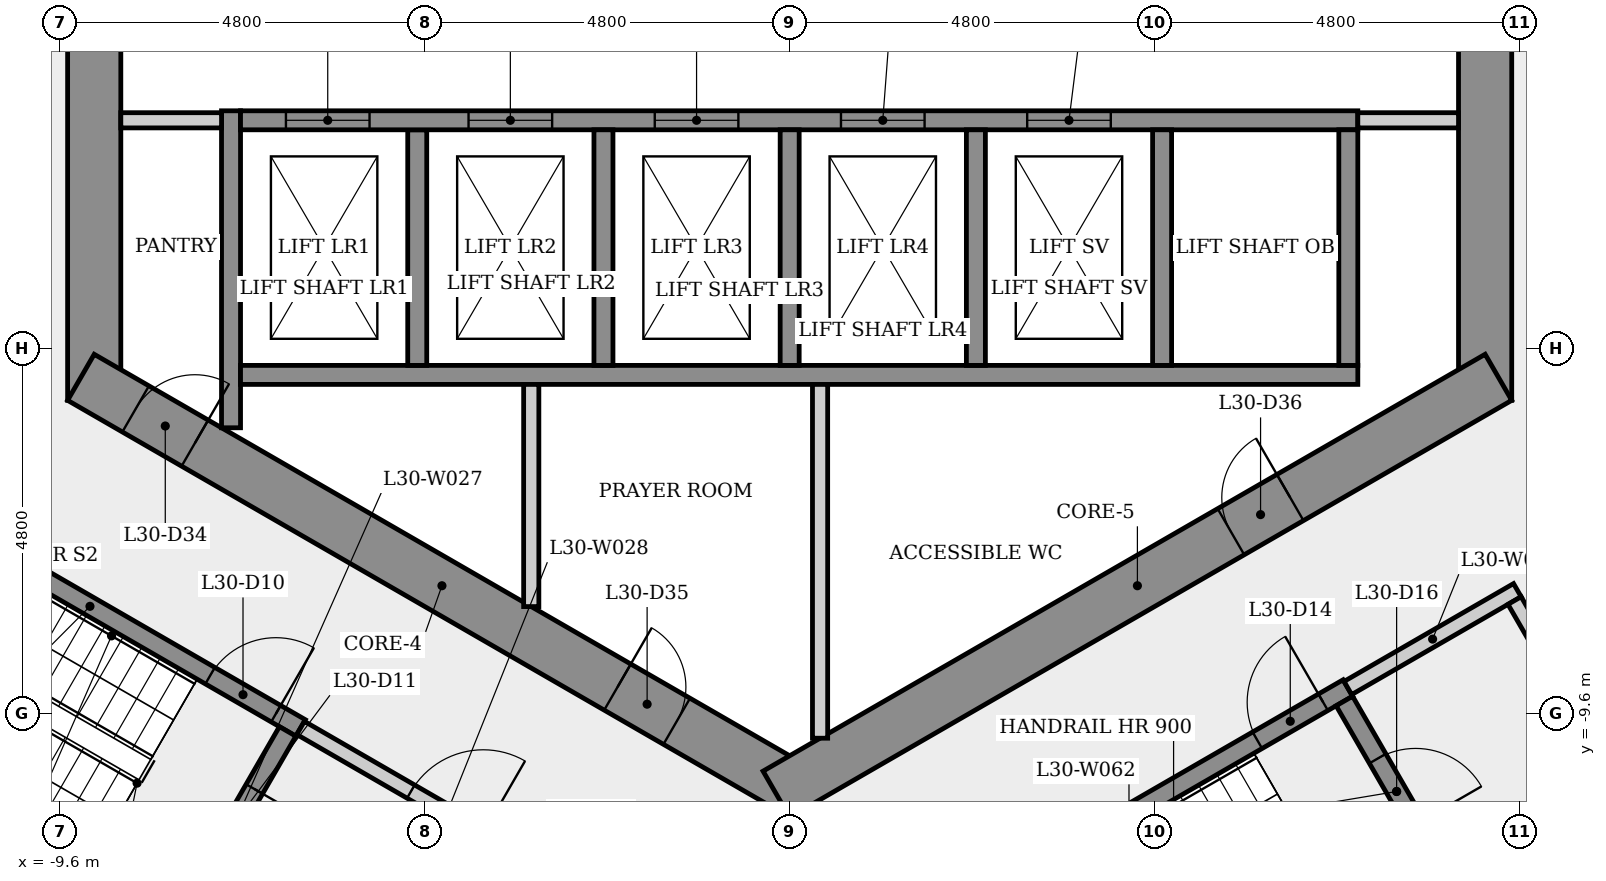
"""IFC4 building model, lengths in metres.
Left out: names, types, materials, properties, quantities, classifications, styles, units other than length and angle.
Written with IfcOpenShell. Run it as: python <this file> out.ifc"""

import sys

from ifc_helpers import new_model, si_unit, direction, frame, frame_2d, origin, place, context, subcontext, project, spatial, rectangle, extrude, element, fill, save


model = new_model("IFC4")
c1 = context("Model", 3, precision=1e-05, world=origin(), true_north=direction((0.0, 1.0)))
c2 = subcontext(c1, "Body", "Model", "MODEL_VIEW")
j1 = project(units=[si_unit("LENGTHUNIT", "METRE"), si_unit("PLANEANGLEUNIT", "RADIAN")], contexts=[c1])
p1 = place(None, origin())
s1 = spatial("IfcSite", under=j1, at=p1, CompositionType="ELEMENT")
p2 = place(p1, origin())
s2 = spatial("IfcBuilding", under=s1, at=p2, CompositionType="ELEMENT")
p3 = place(p2, frame((0.0, 0.0, 113.7)))
s3 = spatial("IfcBuildingStorey", under=s2, at=p3, CompositionType="ELEMENT", Elevation=113.7)
p4 = place(p3, frame((9.15, -5.485, 0.0), z_axis=(0.0, 0.0, 1.0), x_axis=(0.0, 1.0, 0.0)))
e1 = element("IfcWall", 1, at=p4, inside=s3, PredefinedType="SHEAR", context=c2, shape_type="SweptSolid", body=[
    extrude(rectangle(XDim=10.97, YDim=0.7, at=frame_2d((5.485, 0.0))), origin(), (0.0, 0.0, 1.0), 3.4),
])
p5 = place(p4, frame((4.685, 0.0, 0.0)))
e2 = element("IfcOpeningElement", 2, at=p5, cuts=e1, PredefinedType="OPENING", context=c2, shape_type="SweptSolid", body=[
    extrude(rectangle(XDim=1.6, YDim=2.1, at=frame_2d((0.8, 1.05))), frame((0.0, 0.36, 0.0), z_axis=(0.0, -1.0, 0.0), x_axis=(1.0, 0.0, 0.0)), (0.0, 0.0, 1.0), 0.72),
])
p6 = place(p3, frame((-9.15, 5.485, 0.0), z_axis=(0.0, 0.0, 1.0), x_axis=(0.0, -1.0, 0.0)))
e3 = element("IfcWall", 3, at=p6, inside=s3, PredefinedType="SHEAR", context=c2, shape_type="SweptSolid", body=[
    extrude(rectangle(XDim=10.97, YDim=0.7, at=frame_2d((5.485, 0.0))), origin(), (0.0, 0.0, 1.0), 3.4),
])
p7 = place(p6, frame((4.685, 0.0, 0.0)))
e4 = element("IfcOpeningElement", 4, at=p7, cuts=e3, PredefinedType="OPENING", context=c2, shape_type="SweptSolid", body=[
    extrude(rectangle(XDim=1.6, YDim=2.1, at=frame_2d((0.8, 1.05))), frame((0.0, 0.36, 0.0), z_axis=(0.0, -1.0, 0.0), x_axis=(1.0, 0.0, 0.0)), (0.0, 0.0, 1.0), 0.72),
])
p8 = place(p3, frame((-9.325, -5.182, 0.0), z_axis=(0.0, 0.0, 1.0), x_axis=(0.866023993627, -0.500002442456, 0.0)))
e5 = element("IfcWall", 5, at=p8, inside=s3, PredefinedType="SHEAR", context=c2, shape_type="SweptSolid", body=[
    extrude(rectangle(XDim=10.97, YDim=0.7, at=frame_2d((5.485, 0.0))), origin(), (0.0, 0.0, 1.0), 3.4),
])
p9 = place(p8, frame((0.832, 0.0, 0.0)))
e6 = element("IfcOpeningElement", 6, at=p9, cuts=e5, PredefinedType="OPENING", context=c2, shape_type="SweptSolid", body=[
    extrude(rectangle(XDim=0.9, YDim=2.1, at=frame_2d((0.45, 1.05))), frame((0.0, 0.36, 0.0), z_axis=(0.0, -1.0, 0.0), x_axis=(1.0, 0.0, 0.0)), (0.0, 0.0, 1.0), 0.72),
])
p10 = place(p8, frame((8.152, 0.0, 0.0)))
e7 = element("IfcOpeningElement", 7, at=p10, cuts=e5, PredefinedType="OPENING", context=c2, shape_type="SweptSolid", body=[
    extrude(rectangle(XDim=0.9, YDim=2.1, at=frame_2d((0.45, 1.05))), frame((0.0, 0.36, 0.0), z_axis=(0.0, -1.0, 0.0), x_axis=(1.0, 0.0, 0.0)), (0.0, 0.0, 1.0), 0.72),
])
p11 = place(p3, frame((-0.175, -10.667, 0.0), z_axis=(0.0, 0.0, 1.0), x_axis=(0.866023993627, 0.500002442456, 0.0)))
e8 = element("IfcWall", 8, at=p11, inside=s3, PredefinedType="SHEAR", context=c2, shape_type="SweptSolid", body=[
    extrude(rectangle(XDim=10.97, YDim=0.7, at=frame_2d((5.485, 0.0))), origin(), (0.0, 0.0, 1.0), 3.4),
])
p12 = place(p11, frame((6.906, 0.0, 0.0)))
e9 = element("IfcOpeningElement", 9, at=p12, cuts=e8, PredefinedType="OPENING", context=c2, shape_type="SweptSolid", body=[
    extrude(rectangle(XDim=0.9, YDim=2.1, at=frame_2d((0.45, 1.05))), frame((0.0, 0.36, 0.0), z_axis=(0.0, -1.0, 0.0), x_axis=(1.0, 0.0, 0.0)), (0.0, 0.0, 1.0), 0.72),
])
p13 = place(p3, frame((-11.977, -6.595, 0.0), z_axis=(0.0, 0.0, 1.0), x_axis=(0.866025499775, -0.499999833739, 0.0)))
e10 = element("IfcWall", 10, at=p13, inside=s3, PredefinedType="SHEAR", context=c2, shape_type="SweptSolid", body=[
    extrude(rectangle(XDim=6.4, YDim=0.25, at=frame_2d((3.2, 0.0))), origin(), (0.0, 0.0, 1.0), 3.05),
])
p14 = place(p13, frame((5.025, 0.0, 0.0)))
e11 = element("IfcOpeningElement", 11, at=p14, cuts=e10, PredefinedType="OPENING", context=c2, shape_type="SweptSolid", body=[
    extrude(rectangle(XDim=1.0, YDim=2.1, at=frame_2d((0.5, 1.05))), frame((0.0, 0.135, 0.0), z_axis=(0.0, -1.0, 0.0), x_axis=(1.0, 0.0, 0.0)), (0.0, 0.0, 1.0), 0.27),
])
p15 = place(p3, frame((-7.935, -12.393, 0.0), z_axis=(0.0, 0.0, 1.0), x_axis=(-0.866025499775, 0.499999833739, 0.0)))
e12 = element("IfcWall", 12, at=p15, inside=s3, PredefinedType="SHEAR", context=c2, shape_type="SweptSolid", body=[
    extrude(rectangle(XDim=6.4, YDim=0.25, at=frame_2d((3.2, 0.0))), origin(), (0.0, 0.0, 1.0), 3.05),
])
p16 = place(p3, frame((-7.35, -5.846, 0.0), z_axis=(0.0, 0.0, 1.0), x_axis=(0.0, 1.0, 0.0)))
e13 = element("IfcWall", 13, at=p16, inside=s3, PredefinedType="SHEAR", context=c2, shape_type="SweptSolid", body=[
    extrude(rectangle(XDim=4.171, YDim=0.25, at=frame_2d((2.085, 0.0))), origin(), (0.0, 0.0, 1.0), 3.05),
])
p17 = place(p3, frame((-7.475, -1.8, 0.0), z_axis=(0.0, 0.0, 1.0), x_axis=(-1.0, 0.0, 0.0)))
e14 = element("IfcWall", 14, at=p17, inside=s3, PredefinedType="PARTITIONING", context=c2, shape_type="SweptSolid", body=[
    extrude(rectangle(XDim=1.325, YDim=0.2, at=frame_2d((0.663, 0.0))), origin(), (0.0, 0.0, 1.0), 3.05),
])
p18 = place(p3, frame((-6.605, -9.841, 0.0), z_axis=(0.0, 0.0, 1.0), x_axis=(-0.499996545922, -0.866027397988, 0.0)))
e15 = element("IfcWall", 15, at=p18, inside=s3, PredefinedType="SHEAR", context=c2, shape_type="SweptSolid", body=[
    extrude(rectangle(XDim=2.75, YDim=0.25, at=frame_2d((1.375, 0.0))), origin(), (0.0, 0.0, 1.0), 3.05),
])
p19 = place(p18, frame((0.875, 0.0, 0.0)))
e16 = element("IfcOpeningElement", 16, at=p19, cuts=e15, PredefinedType="OPENING", context=c2, shape_type="SweptSolid", body=[
    extrude(rectangle(XDim=1.0, YDim=2.1, at=frame_2d((0.5, 1.05))), frame((0.0, 0.135, 0.0), z_axis=(0.0, -1.0, 0.0), x_axis=(1.0, 0.0, 0.0)), (0.0, 0.0, 1.0), 0.27),
])
p20 = place(p3, frame((-6.435, -9.795, 0.0), z_axis=(0.0, 0.0, 1.0), x_axis=(0.866012907634, -0.500021643343, 0.0)))
e17 = element("IfcWall", 17, at=p20, inside=s3, PredefinedType="PARTITIONING", context=c2, shape_type="SweptSolid", body=[
    extrude(rectangle(XDim=4.45, YDim=0.2, at=frame_2d((2.225, 0.0))), origin(), (0.0, 0.0, 1.0), 3.05),
])
p21 = place(p20, frame((1.675, 0.0, 0.0)))
e18 = element("IfcOpeningElement", 18, at=p21, cuts=e17, PredefinedType="OPENING", context=c2, shape_type="SweptSolid", body=[
    extrude(rectangle(XDim=1.1, YDim=2.1, at=frame_2d((0.55, 1.05))), frame((0.0, 0.11, 0.0), z_axis=(0.0, -1.0, 0.0), x_axis=(1.0, 0.0, 0.0)), (0.0, 0.0, 1.0), 0.22),
])
p22 = place(p3, frame((-7.225, -5.15, 0.0), z_axis=(0.0, 0.0, 1.0), x_axis=(1.0, 0.0, 0.0)))
e19 = element("IfcWall", 19, at=p22, inside=s3, PredefinedType="SHEAR", context=c2, shape_type="SweptSolid", body=[
    extrude(rectangle(XDim=14.7, YDim=0.25, at=frame_2d((7.35, 0.0))), origin(), (0.0, 0.0, 1.0), 3.05),
])
p23 = place(p3, frame((-4.9, -1.925, 0.0), z_axis=(0.0, 0.0, 1.0), x_axis=(0.0, -1.0, 0.0)))
e20 = element("IfcWall", 20, at=p23, inside=s3, PredefinedType="SHEAR", context=c2, shape_type="SweptSolid", body=[
    extrude(rectangle(XDim=3.1, YDim=0.25, at=frame_2d((1.55, 0.0))), origin(), (0.0, 0.0, 1.0), 3.4),
])
p24 = place(p3, frame((-7.225, -1.8, 0.0), z_axis=(0.0, 0.0, 1.0), x_axis=(1.0, 0.0, 0.0)))
e21 = element("IfcWall", 21, at=p24, inside=s3, PredefinedType="SHEAR", context=c2, shape_type="SweptSolid", body=[
    extrude(rectangle(XDim=14.7, YDim=0.25, at=frame_2d((7.35, 0.0))), origin(), (0.0, 0.0, 1.0), 3.05),
])
p25 = place(p24, frame((0.597, 0.0, 0.0)))
e22 = element("IfcOpeningElement", 22, at=p25, cuts=e21, PredefinedType="OPENING", context=c2, shape_type="SweptSolid", body=[
    extrude(rectangle(XDim=1.1, YDim=2.1, at=frame_2d((0.55, 1.05))), frame((0.0, 0.135, 0.0), z_axis=(0.0, -1.0, 0.0), x_axis=(1.0, 0.0, 0.0)), (0.0, 0.0, 1.0), 0.27),
])
p26 = place(p24, frame((3.0, 0.0, 0.0)))
e23 = element("IfcOpeningElement", 23, at=p26, cuts=e21, PredefinedType="OPENING", context=c2, shape_type="SweptSolid", body=[
    extrude(rectangle(XDim=1.1, YDim=2.1, at=frame_2d((0.55, 1.05))), frame((0.0, 0.135, 0.0), z_axis=(0.0, -1.0, 0.0), x_axis=(1.0, 0.0, 0.0)), (0.0, 0.0, 1.0), 0.27),
])
p27 = place(p24, frame((5.45, 0.0, 0.0)))
e24 = element("IfcOpeningElement", 24, at=p27, cuts=e21, PredefinedType="OPENING", context=c2, shape_type="SweptSolid", body=[
    extrude(rectangle(XDim=1.1, YDim=2.1, at=frame_2d((0.55, 1.05))), frame((0.0, 0.135, 0.0), z_axis=(0.0, -1.0, 0.0), x_axis=(1.0, 0.0, 0.0)), (0.0, 0.0, 1.0), 0.27),
])
p28 = place(p24, frame((7.9, 0.0, 0.0)))
e25 = element("IfcOpeningElement", 25, at=p28, cuts=e21, PredefinedType="OPENING", context=c2, shape_type="SweptSolid", body=[
    extrude(rectangle(XDim=1.1, YDim=2.1, at=frame_2d((0.55, 1.05))), frame((0.0, 0.135, 0.0), z_axis=(0.0, -1.0, 0.0), x_axis=(1.0, 0.0, 0.0)), (0.0, 0.0, 1.0), 0.27),
])
p29 = place(p24, frame((10.35, 0.0, 0.0)))
e26 = element("IfcOpeningElement", 26, at=p29, cuts=e21, PredefinedType="OPENING", context=c2, shape_type="SweptSolid", body=[
    extrude(rectangle(XDim=1.1, YDim=2.1, at=frame_2d((0.55, 1.05))), frame((0.0, 0.135, 0.0), z_axis=(0.0, -1.0, 0.0), x_axis=(1.0, 0.0, 0.0)), (0.0, 0.0, 1.0), 0.27),
])
p30 = place(p3, frame((-3.4, -5.275, 0.0), z_axis=(0.0, 0.0, 1.0), x_axis=(0.0, -1.0, 0.0)))
e27 = element("IfcWall", 27, at=p30, inside=s3, PredefinedType="PARTITIONING", context=c2, shape_type="SweptSolid", body=[
    extrude(rectangle(XDim=2.924, YDim=0.2, at=frame_2d((1.462, 0.0))), origin(), (0.0, 0.0, 1.0), 3.05),
])
for number, where, z_axis, x_axis in (
    (28, (-2.45, -1.925, 0.0), (0.0, 0.0, 1.0), (0.0, -1.0, 0.0)),
    (29, (0.0, -1.925, 0.0), (0.0, 0.0, 1.0), (0.0, -1.0, 0.0)),
):
    element("IfcWall", number, at=place(p3, frame(where, z_axis=z_axis, x_axis=x_axis)), inside=s3, PredefinedType="SHEAR", context=c2, shape_type="SweptSolid", body=[
        extrude(rectangle(XDim=3.1, YDim=0.25, at=frame_2d((1.55, 0.0))), origin(), (0.0, 0.0, 1.0), 3.4),
    ])
p31 = place(p3, frame((0.4, -5.275, 0.0), z_axis=(0.0, 0.0, 1.0), x_axis=(0.0, -1.0, 0.0)))
e30 = element("IfcWall", 30, at=p31, inside=s3, PredefinedType="PARTITIONING", context=c2, shape_type="SweptSolid", body=[
    extrude(rectangle(XDim=4.656, YDim=0.2, at=frame_2d((2.328, 0.0))), origin(), (0.0, 0.0, 1.0), 3.05),
])
p32 = place(p3, frame((1.585, -12.595, 0.0), z_axis=(0.0, 0.0, 1.0), x_axis=(0.866036417653, 0.499980922934, 0.0)))
e31 = element("IfcWall", 31, at=p32, inside=s3, PredefinedType="SHEAR", context=c2, shape_type="SweptSolid", body=[
    extrude(rectangle(XDim=6.65, YDim=0.25, at=frame_2d((3.325, 0.0))), origin(), (0.0, 0.0, 1.0), 3.05),
])
p33 = place(p32, frame((5.275, 0.0, 0.0)))
e32 = element("IfcOpeningElement", 32, at=p33, cuts=e31, PredefinedType="OPENING", context=c2, shape_type="SweptSolid", body=[
    extrude(rectangle(XDim=1.0, YDim=2.1, at=frame_2d((0.5, 1.05))), frame((0.0, 0.135, 0.0), z_axis=(0.0, -1.0, 0.0), x_axis=(1.0, 0.0, 0.0)), (0.0, 0.0, 1.0), 0.27),
])
for number, where, z_axis, x_axis in (
    (33, (2.45, -1.925, 0.0), (0.0, 0.0, 1.0), (0.0, -1.0, 0.0)),
    (34, (4.9, -1.925, 0.0), (0.0, 0.0, 1.0), (0.0, -1.0, 0.0)),
):
    element("IfcWall", number, at=place(p3, frame(where, z_axis=z_axis, x_axis=x_axis)), inside=s3, PredefinedType="SHEAR", context=c2, shape_type="SweptSolid", body=[
        extrude(rectangle(XDim=3.1, YDim=0.25, at=frame_2d((1.55, 0.0))), origin(), (0.0, 0.0, 1.0), 3.4),
    ])
p34 = place(p3, frame((7.298, -9.441, 0.0), z_axis=(0.0, 0.0, 1.0), x_axis=(0.500034990121, -0.866005201286, 0.0)))
e35 = element("IfcWall", 35, at=p34, inside=s3, PredefinedType="SHEAR", context=c2, shape_type="SweptSolid", body=[
    extrude(rectangle(XDim=2.75, YDim=0.25, at=frame_2d((1.375, 0.0))), origin(), (0.0, 0.0, 1.0), 3.05),
])
p35 = place(p34, frame((0.875, 0.0, 0.0)))
e36 = element("IfcOpeningElement", 36, at=p35, cuts=e35, PredefinedType="OPENING", context=c2, shape_type="SweptSolid", body=[
    extrude(rectangle(XDim=1.0, YDim=2.1, at=frame_2d((0.5, 1.05))), frame((0.0, 0.135, 0.0), z_axis=(0.0, -1.0, 0.0), x_axis=(1.0, 0.0, 0.0)), (0.0, 0.0, 1.0), 0.27),
])
p36 = place(p3, frame((7.344, -9.27, 0.0), z_axis=(0.0, 0.0, 1.0), x_axis=(0.866005588531, 0.500034319456, 0.0)))
e37 = element("IfcWall", 37, at=p36, inside=s3, PredefinedType="PARTITIONING", context=c2, shape_type="SweptSolid", body=[
    extrude(rectangle(XDim=2.575, YDim=0.2, at=frame_2d((1.288, 0.0))), origin(), (0.0, 0.0, 1.0), 3.05),
])
p37 = place(p3, frame((7.35, -1.925, 0.0), z_axis=(0.0, 0.0, 1.0), x_axis=(0.0, -1.0, 0.0)))
e38 = element("IfcWall", 38, at=p37, inside=s3, PredefinedType="SHEAR", context=c2, shape_type="SweptSolid", body=[
    extrude(rectangle(XDim=3.1, YDim=0.25, at=frame_2d((1.55, 0.0))), origin(), (0.0, 0.0, 1.0), 3.4),
])
p38 = place(p3, frame((8.8, -1.8, 0.0), z_axis=(0.0, 0.0, 1.0), x_axis=(-1.0, 0.0, 0.0)))
e39 = element("IfcWall", 39, at=p38, inside=s3, PredefinedType="PARTITIONING", context=c2, shape_type="SweptSolid", body=[
    extrude(rectangle(XDim=1.325, YDim=0.2, at=frame_2d((0.663, 0.0))), origin(), (0.0, 0.0, 1.0), 3.05),
])
p39 = place(p3, frame((9.537, -8.119, 0.0), z_axis=(0.0, 0.0, 1.0), x_axis=(0.499990139034, -0.866031096941, 0.0)))
e40 = element("IfcWall", 40, at=p39, inside=s3, PredefinedType="PARTITIONING", context=c2, shape_type="SweptSolid", body=[
    extrude(rectangle(XDim=3.0, YDim=0.2, at=frame_2d((1.5, 0.0))), origin(), (0.0, 0.0, 1.0), 3.05),
])
p40 = place(p39, frame((0.935, 0.0, 0.0)))
e41 = element("IfcOpeningElement", 41, at=p40, cuts=e40, PredefinedType="OPENING", context=c2, shape_type="SweptSolid", body=[
    extrude(rectangle(XDim=1.0, YDim=2.1, at=frame_2d((0.5, 1.05))), frame((0.0, 0.11, 0.0), z_axis=(0.0, -1.0, 0.0), x_axis=(1.0, 0.0, 0.0)), (0.0, 0.0, 1.0), 0.22),
])
p41 = place(p3, frame((10.901, -10.681, 0.0), z_axis=(0.0, 0.0, 1.0), x_axis=(-0.866007538022, -0.500030943131, 0.0)))
e42 = element("IfcWall", 42, at=p41, inside=s3, PredefinedType="PARTITIONING", context=c2, shape_type="SweptSolid", body=[
    extrude(rectangle(XDim=2.375, YDim=0.2, at=frame_2d((1.188, 0.0))), origin(), (0.0, 0.0, 1.0), 3.05),
])
p42 = place(p25, origin())
e43 = element("IfcDoor", 43, at=p42, inside=s3, OperationType="SLIDING_TO_LEFT", PredefinedType="DOOR", context=c2, shape_type="SweptSolid", body=[
    extrude(rectangle(XDim=1.1, YDim=2.1, at=frame_2d((0.55, 1.05))), frame((0.0, 0.025, 0.0), z_axis=(0.0, -1.0, 0.0), x_axis=(1.0, 0.0, 0.0)), (0.0, 0.0, 1.0), 0.05),
])
fill(e22, e43)
p43 = place(p26, origin())
e44 = element("IfcDoor", 44, at=p43, inside=s3, OperationType="SLIDING_TO_LEFT", PredefinedType="DOOR", context=c2, shape_type="SweptSolid", body=[
    extrude(rectangle(XDim=1.1, YDim=2.1, at=frame_2d((0.55, 1.05))), frame((0.0, 0.025, 0.0), z_axis=(0.0, -1.0, 0.0), x_axis=(1.0, 0.0, 0.0)), (0.0, 0.0, 1.0), 0.05),
])
fill(e23, e44)
p44 = place(p27, origin())
e45 = element("IfcDoor", 45, at=p44, inside=s3, OperationType="SLIDING_TO_LEFT", PredefinedType="DOOR", context=c2, shape_type="SweptSolid", body=[
    extrude(rectangle(XDim=1.1, YDim=2.1, at=frame_2d((0.55, 1.05))), frame((0.0, 0.025, 0.0), z_axis=(0.0, -1.0, 0.0), x_axis=(1.0, 0.0, 0.0)), (0.0, 0.0, 1.0), 0.05),
])
fill(e24, e45)
p45 = place(p28, origin())
e46 = element("IfcDoor", 46, at=p45, inside=s3, OperationType="SLIDING_TO_LEFT", PredefinedType="DOOR", context=c2, shape_type="SweptSolid", body=[
    extrude(rectangle(XDim=1.1, YDim=2.1, at=frame_2d((0.55, 1.05))), frame((0.0, 0.025, 0.0), z_axis=(0.0, -1.0, 0.0), x_axis=(1.0, 0.0, 0.0)), (0.0, 0.0, 1.0), 0.05),
])
fill(e25, e46)
p46 = place(p29, origin())
e47 = element("IfcDoor", 47, at=p46, inside=s3, OperationType="SLIDING_TO_LEFT", PredefinedType="DOOR", context=c2, shape_type="SweptSolid", body=[
    extrude(rectangle(XDim=1.1, YDim=2.1, at=frame_2d((0.55, 1.05))), frame((0.0, 0.025, 0.0), z_axis=(0.0, -1.0, 0.0), x_axis=(1.0, 0.0, 0.0)), (0.0, 0.0, 1.0), 0.05),
])
fill(e26, e47)
p47 = place(p14, origin())
e48 = element("IfcDoor", 48, at=p47, inside=s3, OperationType="SINGLE_SWING_RIGHT", PredefinedType="DOOR", context=c2, shape_type="SweptSolid", body=[
    extrude(rectangle(XDim=1.0, YDim=2.1, at=frame_2d((0.5, 1.05))), frame((0.0, 0.025, 0.0), z_axis=(0.0, -1.0, 0.0), x_axis=(1.0, 0.0, 0.0)), (0.0, 0.0, 1.0), 0.05),
])
fill(e11, e48)
p48 = place(p19, origin())
e49 = element("IfcDoor", 49, at=p48, inside=s3, OperationType="SINGLE_SWING_LEFT", PredefinedType="DOOR", context=c2, shape_type="SweptSolid", body=[
    extrude(rectangle(XDim=1.0, YDim=2.1, at=frame_2d((0.5, 1.05))), frame((0.0, 0.025, 0.0), z_axis=(0.0, -1.0, 0.0), x_axis=(1.0, 0.0, 0.0)), (0.0, 0.0, 1.0), 0.05),
])
fill(e16, e49)
p49 = place(p21, origin())
e50 = element("IfcDoor", 50, at=p49, inside=s3, OperationType="SINGLE_SWING_RIGHT", PredefinedType="DOOR", context=c2, shape_type="SweptSolid", body=[
    extrude(rectangle(XDim=1.1, YDim=2.1, at=frame_2d((0.55, 1.05))), frame((0.0, 0.025, 0.0), z_axis=(0.0, -1.0, 0.0), x_axis=(1.0, 0.0, 0.0)), (0.0, 0.0, 1.0), 0.05),
])
fill(e18, e50)
p50 = place(p33, origin())
e51 = element("IfcDoor", 51, at=p50, inside=s3, OperationType="SINGLE_SWING_RIGHT", PredefinedType="DOOR", context=c2, shape_type="SweptSolid", body=[
    extrude(rectangle(XDim=1.0, YDim=2.1, at=frame_2d((0.5, 1.05))), frame((0.0, 0.025, 0.0), z_axis=(0.0, -1.0, 0.0), x_axis=(1.0, 0.0, 0.0)), (0.0, 0.0, 1.0), 0.05),
])
fill(e32, e51)
p51 = place(p35, origin())
e52 = element("IfcDoor", 52, at=p51, inside=s3, OperationType="SINGLE_SWING_RIGHT", PredefinedType="DOOR", context=c2, shape_type="SweptSolid", body=[
    extrude(rectangle(XDim=1.0, YDim=2.1, at=frame_2d((0.5, 1.05))), frame((0.0, 0.025, 0.0), z_axis=(0.0, -1.0, 0.0), x_axis=(1.0, 0.0, 0.0)), (0.0, 0.0, 1.0), 0.05),
])
fill(e36, e52)
p52 = place(p9, origin())
e53 = element("IfcDoor", 53, at=p52, inside=s3, OperationType="SINGLE_SWING_RIGHT", PredefinedType="DOOR", context=c2, shape_type="SweptSolid", body=[
    extrude(rectangle(XDim=0.9, YDim=2.1, at=frame_2d((0.45, 1.05))), frame((0.0, 0.025, 0.0), z_axis=(0.0, -1.0, 0.0), x_axis=(1.0, 0.0, 0.0)), (0.0, 0.0, 1.0), 0.05),
])
fill(e6, e53)
p53 = place(p10, origin())
e54 = element("IfcDoor", 54, at=p53, inside=s3, OperationType="SINGLE_SWING_LEFT", PredefinedType="DOOR", context=c2, shape_type="SweptSolid", body=[
    extrude(rectangle(XDim=0.9, YDim=2.1, at=frame_2d((0.45, 1.05))), frame((0.0, 0.025, 0.0), z_axis=(0.0, -1.0, 0.0), x_axis=(1.0, 0.0, 0.0)), (0.0, 0.0, 1.0), 0.05),
])
fill(e7, e54)
p54 = place(p12, origin())
e55 = element("IfcDoor", 55, at=p54, inside=s3, OperationType="SINGLE_SWING_RIGHT", PredefinedType="DOOR", context=c2, shape_type="SweptSolid", body=[
    extrude(rectangle(XDim=0.9, YDim=2.1, at=frame_2d((0.45, 1.05))), frame((0.0, 0.025, 0.0), z_axis=(0.0, -1.0, 0.0), x_axis=(1.0, 0.0, 0.0)), (0.0, 0.0, 1.0), 0.05),
])
fill(e9, e55)
save(model, sys.argv[1])
